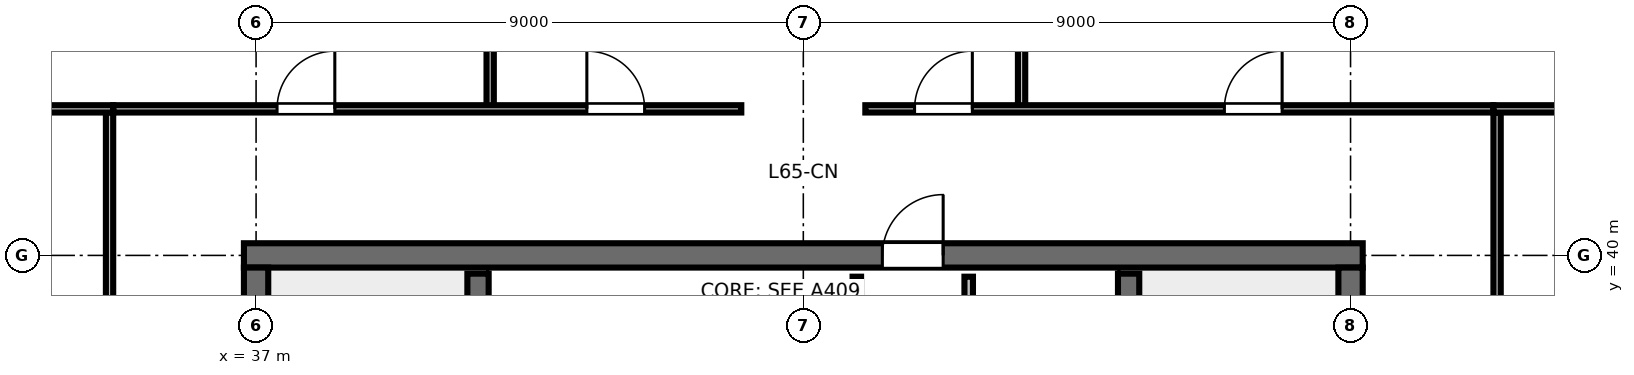
"""IFC4 building model, lengths in metres.
Left out: names, types, materials, properties, quantities, classifications, styles, units other than length and angle.
Written with IfcOpenShell. Run it as: python <this file> out.ifc"""

import sys

from ifc_helpers import new_model, si_unit, direction, frame, frame_2d, origin, place, context, subcontext, project, spatial, rectangle, extrude, element, fill, save


model = new_model("IFC4")
c1 = context("Model", 3, precision=1e-05, world=origin(), true_north=direction((0.0, 1.0)))
c2 = subcontext(c1, "Body", "Model", "MODEL_VIEW")
j1 = project(units=[si_unit("LENGTHUNIT", "METRE"), si_unit("PLANEANGLEUNIT", "RADIAN")], contexts=[c1])
p1 = place(None, origin())
s1 = spatial("IfcSite", under=j1, at=p1, CompositionType="ELEMENT")
p2 = place(p1, origin())
s2 = spatial("IfcBuilding", under=s1, at=p2, CompositionType="ELEMENT")
p3 = place(p2, frame((0.0, 0.0, 246.6)))
s3 = spatial("IfcBuildingStorey", under=s2, at=p3, CompositionType="ELEMENT", Elevation=246.6)
p4 = place(p3, frame((36.8, 40.0, 0.0), z_axis=(0.0, 0.0, 1.0), x_axis=(1.0, 0.0, 0.0)))
e1 = element("IfcWall", 1, at=p4, inside=s3, PredefinedType="SHEAR", context=c2, shape_type="SweptSolid", body=[
    extrude(rectangle(XDim=18.4, YDim=0.4, at=frame_2d((9.2, 0.0))), origin(), (0.0, 0.0, 1.0), 3.36),
])
p5 = place(p4, frame((10.5, 0.0, 0.0)))
e2 = element("IfcOpeningElement", 2, at=p5, cuts=e1, PredefinedType="OPENING", context=c2, shape_type="SweptSolid", body=[
    extrude(rectangle(XDim=1.0, YDim=2.15, at=frame_2d((0.5, 1.075))), frame((0.0, 0.21, 0.0), z_axis=(0.0, -1.0, 0.0), x_axis=(1.0, 0.0, 0.0)), (0.0, 0.0, 1.0), 0.42),
])
p6 = place(p3, frame((37.0, 24.2, 0.0), z_axis=(0.0, 0.0, 1.0), x_axis=(0.0, 1.0, 0.0)))
e3 = element("IfcWall", 3, at=p6, inside=s3, PredefinedType="SHEAR", context=c2, shape_type="SweptSolid", body=[
    extrude(rectangle(XDim=15.6, YDim=0.4, at=frame_2d((7.8, 0.0))), origin(), (0.0, 0.0, 1.0), 3.36),
])
p7 = place(p6, frame((5.325, 0.0, 0.0)))
e4 = element("IfcOpeningElement", 4, at=p7, cuts=e3, PredefinedType="OPENING", context=c2, shape_type="SweptSolid", body=[
    extrude(rectangle(XDim=1.15, YDim=2.15, at=frame_2d((0.575, 1.075))), frame((0.0, 0.21, 0.0), z_axis=(0.0, -1.0, 0.0), x_axis=(1.0, 0.0, 0.0)), (0.0, 0.0, 1.0), 0.42),
])
p8 = place(p3, frame((55.0, 24.2, 0.0), z_axis=(0.0, 0.0, 1.0), x_axis=(0.0, 1.0, 0.0)))
e5 = element("IfcWall", 5, at=p8, inside=s3, PredefinedType="SHEAR", context=c2, shape_type="SweptSolid", body=[
    extrude(rectangle(XDim=15.6, YDim=0.4, at=frame_2d((7.8, 0.0))), origin(), (0.0, 0.0, 1.0), 3.36),
])
p9 = place(p8, frame((5.325, 0.0, 0.0)))
e6 = element("IfcOpeningElement", 6, at=p9, cuts=e5, PredefinedType="OPENING", context=c2, shape_type="SweptSolid", body=[
    extrude(rectangle(XDim=1.15, YDim=2.15, at=frame_2d((0.575, 1.075))), frame((0.0, 0.21, 0.0), z_axis=(0.0, -1.0, 0.0), x_axis=(1.0, 0.0, 0.0)), (0.0, 0.0, 1.0), 0.42),
])
for number, where, z_axis, x_axis in (
    (7, (65.144, 41.854, 0.0), (0.0, 0.0, 1.0), (-0.707, 0.707, 0.0)),
    (8, (34.396, 49.394, 0.0), (0.0, 0.0, 1.0), (-0.707, -0.707, 0.0)),
):
    element("IfcWall", number, at=place(p3, frame(where, z_axis=z_axis, x_axis=x_axis)), inside=s3, PredefinedType="STANDARD", context=c2, shape_type="SweptSolid", body=[
        extrude(rectangle(XDim=10.662, YDim=0.265, at=frame_2d((5.331, 0.0))), origin(), (0.0, 0.0, 1.0), 2.832),
    ])
for number, where, z_axis, x_axis in (
    (9, (40.65, 32.0, 0.0), (0.0, 0.0, 1.0), (0.0, 1.0, 0.0)),
    (10, (51.35, 32.0, 0.0), (0.0, 0.0, 1.0), (0.0, 1.0, 0.0)),
):
    element("IfcWall", number, at=place(p3, frame(where, z_axis=z_axis, x_axis=x_axis)), inside=s3, PredefinedType="SHEAR", context=c2, shape_type="SweptSolid", body=[
        extrude(rectangle(XDim=7.7, YDim=0.35, at=frame_2d((3.85, 0.0))), origin(), (0.0, 0.0, 1.0), 3.6),
    ])
p10 = place(p3, frame((46.88, 32.05, 0.0), z_axis=(0.0, 0.0, 1.0), x_axis=(0.0, 1.0, 0.0)))
e11 = element("IfcWall", 11, at=p10, inside=s3, PredefinedType="PARTITIONING", context=c2, shape_type="SweptSolid", body=[
    extrude(rectangle(XDim=7.6, YDim=0.14, at=frame_2d((3.8, 0.0))), origin(), (0.0, 0.0, 1.0), 3.375),
])
p11 = place(p10, frame((3.4, 0.0, 0.0)))
e12 = element("IfcOpeningElement", 12, at=p11, cuts=e11, PredefinedType="OPENING", context=c2, shape_type="SweptSolid", body=[
    extrude(rectangle(XDim=0.95, YDim=2.15, at=frame_2d((0.475, 1.075))), frame((0.0, 0.08, 0.0), z_axis=(0.0, -1.0, 0.0), x_axis=(1.0, 0.0, 0.0)), (0.0, 0.0, 1.0), 0.16),
])
p12 = place(p3, frame((48.72, 32.05, 0.0), z_axis=(0.0, 0.0, 1.0), x_axis=(0.0, 1.0, 0.0)))
e13 = element("IfcWall", 13, at=p12, inside=s3, PredefinedType="PARTITIONING", context=c2, shape_type="SweptSolid", body=[
    extrude(rectangle(XDim=7.6, YDim=0.14, at=frame_2d((3.8, 0.0))), origin(), (0.0, 0.0, 1.0), 3.375),
])
p13 = place(p12, frame((0.8, 0.0, 0.0)))
e14 = element("IfcOpeningElement", 14, at=p13, cuts=e13, PredefinedType="OPENING", context=c2, shape_type="SweptSolid", body=[
    extrude(rectangle(XDim=0.9, YDim=2.15, at=frame_2d((0.45, 1.075))), frame((0.0, 0.08, 0.0), z_axis=(0.0, -1.0, 0.0), x_axis=(1.0, 0.0, 0.0)), (0.0, 0.0, 1.0), 0.16),
])
p14 = place(p12, frame((3.35, 0.0, 0.0)))
e15 = element("IfcOpeningElement", 15, at=p14, cuts=e13, PredefinedType="OPENING", context=c2, shape_type="SweptSolid", body=[
    extrude(rectangle(XDim=0.9, YDim=2.15, at=frame_2d((0.45, 1.075))), frame((0.0, 0.08, 0.0), z_axis=(0.0, -1.0, 0.0), x_axis=(1.0, 0.0, 0.0)), (0.0, 0.0, 1.0), 0.16),
])
p15 = place(p12, frame((5.9, 0.0, 0.0)))
e16 = element("IfcOpeningElement", 16, at=p15, cuts=e13, PredefinedType="OPENING", context=c2, shape_type="SweptSolid", body=[
    extrude(rectangle(XDim=0.92, YDim=2.15, at=frame_2d((0.46, 1.075))), frame((0.0, 0.08, 0.0), z_axis=(0.0, -1.0, 0.0), x_axis=(1.0, 0.0, 0.0)), (0.0, 0.0, 1.0), 0.16),
])
p16 = place(p3, frame((40.85, 42.41, 0.0), z_axis=(0.0, 0.0, 1.0), x_axis=(0.0, 1.0, 0.0)))
e17 = element("IfcWall", 17, at=p16, inside=s3, PredefinedType="PARTITIONING", context=c2, shape_type="SweptSolid", body=[
    extrude(rectangle(XDim=6.41, YDim=0.12, at=frame_2d((3.205, 0.0))), origin(), (0.0, 0.0, 1.0), 2.655),
])
p17 = place(p16, frame((1.4, 0.0, 0.0)))
e18 = element("IfcOpeningElement", 18, at=p17, cuts=e17, PredefinedType="OPENING", context=c2, shape_type="SweptSolid", body=[
    extrude(rectangle(XDim=0.9, YDim=2.15, at=frame_2d((0.45, 1.075))), frame((0.0, 0.07, 0.0), z_axis=(0.0, -1.0, 0.0), x_axis=(1.0, 0.0, 0.0)), (0.0, 0.0, 1.0), 0.14),
])
p18 = place(p3, frame((49.59, 42.41, 0.0), z_axis=(0.0, 0.0, 1.0), x_axis=(0.0, 1.0, 0.0)))
e19 = element("IfcWall", 19, at=p18, inside=s3, PredefinedType="PARTITIONING", context=c2, shape_type="SweptSolid", body=[
    extrude(rectangle(XDim=6.41, YDim=0.12, at=frame_2d((3.205, 0.0))), origin(), (0.0, 0.0, 1.0), 2.655),
])
p19 = place(p18, frame((1.4, 0.0, 0.0)))
e20 = element("IfcOpeningElement", 20, at=p19, cuts=e19, PredefinedType="OPENING", context=c2, shape_type="SweptSolid", body=[
    extrude(rectangle(XDim=0.9, YDim=2.15, at=frame_2d((0.45, 1.075))), frame((0.0, 0.07, 0.0), z_axis=(0.0, -1.0, 0.0), x_axis=(1.0, 0.0, 0.0)), (0.0, 0.0, 1.0), 0.14),
])
p20 = place(p3, frame((34.65, 42.41, 0.0), z_axis=(0.0, 0.0, 1.0), x_axis=(1.0, 0.0, 0.0)))
e21 = element("IfcWall", 21, at=p20, inside=s3, PredefinedType="PARTITIONING", context=c2, shape_type="SweptSolid", body=[
    extrude(rectangle(XDim=10.33, YDim=0.12, at=frame_2d((5.165, 0.0))), origin(), (0.0, 0.0, 1.0), 2.655),
])
p21 = place(p20, frame((2.695, 0.0, 0.0)))
e22 = element("IfcOpeningElement", 22, at=p21, cuts=e21, PredefinedType="OPENING", context=c2, shape_type="SweptSolid", body=[
    extrude(rectangle(XDim=0.95, YDim=2.15, at=frame_2d((0.475, 1.075))), frame((0.0, 0.07, 0.0), z_axis=(0.0, -1.0, 0.0), x_axis=(1.0, 0.0, 0.0)), (0.0, 0.0, 1.0), 0.14),
])
p22 = place(p20, frame((7.79, 0.0, 0.0)))
e23 = element("IfcOpeningElement", 23, at=p22, cuts=e21, PredefinedType="OPENING", context=c2, shape_type="SweptSolid", body=[
    extrude(rectangle(XDim=0.95, YDim=2.15, at=frame_2d((0.475, 1.075))), frame((0.0, 0.07, 0.0), z_axis=(0.0, -1.0, 0.0), x_axis=(1.0, 0.0, 0.0)), (0.0, 0.0, 1.0), 0.14),
])
p23 = place(p3, frame((47.02, 42.41, 0.0), z_axis=(0.0, 0.0, 1.0), x_axis=(1.0, 0.0, 0.0)))
e24 = element("IfcWall", 24, at=p23, inside=s3, PredefinedType="PARTITIONING", context=c2, shape_type="SweptSolid", body=[
    extrude(rectangle(XDim=10.33, YDim=0.12, at=frame_2d((5.165, 0.0))), origin(), (0.0, 0.0, 1.0), 2.655),
])
p24 = place(p23, frame((0.81, 0.0, 0.0)))
e25 = element("IfcOpeningElement", 25, at=p24, cuts=e24, PredefinedType="OPENING", context=c2, shape_type="SweptSolid", body=[
    extrude(rectangle(XDim=0.95, YDim=2.15, at=frame_2d((0.475, 1.075))), frame((0.0, 0.07, 0.0), z_axis=(0.0, -1.0, 0.0), x_axis=(1.0, 0.0, 0.0)), (0.0, 0.0, 1.0), 0.14),
])
p25 = place(p23, frame((5.905, 0.0, 0.0)))
e26 = element("IfcOpeningElement", 26, at=p25, cuts=e24, PredefinedType="OPENING", context=c2, shape_type="SweptSolid", body=[
    extrude(rectangle(XDim=0.95, YDim=2.15, at=frame_2d((0.475, 1.075))), frame((0.0, 0.07, 0.0), z_axis=(0.0, -1.0, 0.0), x_axis=(1.0, 0.0, 0.0)), (0.0, 0.0, 1.0), 0.14),
])
p26 = place(p3, frame((34.59, 21.65, 0.0), z_axis=(0.0, 0.0, 1.0), x_axis=(0.0, 1.0, 0.0)))
e27 = element("IfcWall", 27, at=p26, inside=s3, PredefinedType="PARTITIONING", context=c2, shape_type="SweptSolid", body=[
    extrude(rectangle(XDim=20.7, YDim=0.12, at=frame_2d((10.35, 0.0))), origin(), (0.0, 0.0, 1.0), 2.655),
])
p27 = place(p26, frame((4.26, 0.0, 0.0)))
e28 = element("IfcOpeningElement", 28, at=p27, cuts=e27, PredefinedType="OPENING", context=c2, shape_type="SweptSolid", body=[
    extrude(rectangle(XDim=0.95, YDim=2.15, at=frame_2d((0.475, 1.075))), frame((0.0, 0.07, 0.0), z_axis=(0.0, -1.0, 0.0), x_axis=(1.0, 0.0, 0.0)), (0.0, 0.0, 1.0), 0.14),
])
p28 = place(p26, frame((14.411, 0.0, 0.0)))
e29 = element("IfcOpeningElement", 29, at=p28, cuts=e27, PredefinedType="OPENING", context=c2, shape_type="SweptSolid", body=[
    extrude(rectangle(XDim=0.95, YDim=2.15, at=frame_2d((0.475, 1.075))), frame((0.0, 0.07, 0.0), z_axis=(0.0, -1.0, 0.0), x_axis=(1.0, 0.0, 0.0)), (0.0, 0.0, 1.0), 0.14),
])
p29 = place(p3, frame((57.41, 21.65, 0.0), z_axis=(0.0, 0.0, 1.0), x_axis=(0.0, 1.0, 0.0)))
e30 = element("IfcWall", 30, at=p29, inside=s3, PredefinedType="PARTITIONING", context=c2, shape_type="SweptSolid", body=[
    extrude(rectangle(XDim=20.7, YDim=0.12, at=frame_2d((10.35, 0.0))), origin(), (0.0, 0.0, 1.0), 2.655),
])
p30 = place(p29, frame((9.875, 0.0, 0.0)))
e31 = element("IfcOpeningElement", 31, at=p30, cuts=e30, PredefinedType="OPENING", context=c2, shape_type="SweptSolid", body=[
    extrude(rectangle(XDim=0.95, YDim=2.15, at=frame_2d((0.475, 1.075))), frame((0.0, 0.07, 0.0), z_axis=(0.0, -1.0, 0.0), x_axis=(1.0, 0.0, 0.0)), (0.0, 0.0, 1.0), 0.14),
])
for number, where, z_axis, x_axis in (
    (32, (34.65, 42.41, 0.0), (0.0, 0.0, 1.0), (-1.0, 0.0, 0.0)),
    (33, (57.35, 42.41, 0.0), (0.0, 0.0, 1.0), (1.0, 0.0, 0.0)),
):
    element("IfcWall", number, at=place(p3, frame(where, z_axis=z_axis, x_axis=x_axis)), inside=s3, PredefinedType="PARTITIONING", context=c2, shape_type="SweptSolid", body=[
        extrude(rectangle(XDim=7.22, YDim=0.12, at=frame_2d((3.61, 0.0))), origin(), (0.0, 0.0, 1.0), 2.655),
    ])
p31 = place(p5, origin())
e34 = element("IfcDoor", 34, at=p31, inside=s3, OperationType="SINGLE_SWING_RIGHT", PredefinedType="DOOR", context=c2, shape_type="SweptSolid", body=[
    extrude(rectangle(XDim=1.0, YDim=2.15, at=frame_2d((0.5, 1.075))), frame((0.0, 0.025, 0.0), z_axis=(0.0, -1.0, 0.0), x_axis=(1.0, 0.0, 0.0)), (0.0, 0.0, 1.0), 0.05),
])
fill(e2, e34)
p32 = place(p21, origin())
e35 = element("IfcDoor", 35, at=p32, inside=s3, OperationType="SINGLE_SWING_RIGHT", PredefinedType="DOOR", context=c2, shape_type="SweptSolid", body=[
    extrude(rectangle(XDim=0.95, YDim=2.15, at=frame_2d((0.475, 1.075))), frame((0.0, 0.025, 0.0), z_axis=(0.0, -1.0, 0.0), x_axis=(1.0, 0.0, 0.0)), (0.0, 0.0, 1.0), 0.05),
])
fill(e22, e35)
p33 = place(p22, origin())
e36 = element("IfcDoor", 36, at=p33, inside=s3, OperationType="SINGLE_SWING_LEFT", PredefinedType="DOOR", context=c2, shape_type="SweptSolid", body=[
    extrude(rectangle(XDim=0.95, YDim=2.15, at=frame_2d((0.475, 1.075))), frame((0.0, 0.025, 0.0), z_axis=(0.0, -1.0, 0.0), x_axis=(1.0, 0.0, 0.0)), (0.0, 0.0, 1.0), 0.05),
])
fill(e23, e36)
p34 = place(p24, origin())
e37 = element("IfcDoor", 37, at=p34, inside=s3, OperationType="SINGLE_SWING_RIGHT", PredefinedType="DOOR", context=c2, shape_type="SweptSolid", body=[
    extrude(rectangle(XDim=0.95, YDim=2.15, at=frame_2d((0.475, 1.075))), frame((0.0, 0.025, 0.0), z_axis=(0.0, -1.0, 0.0), x_axis=(1.0, 0.0, 0.0)), (0.0, 0.0, 1.0), 0.05),
])
fill(e25, e37)
p35 = place(p25, origin())
e38 = element("IfcDoor", 38, at=p35, inside=s3, OperationType="SINGLE_SWING_RIGHT", PredefinedType="DOOR", context=c2, shape_type="SweptSolid", body=[
    extrude(rectangle(XDim=0.95, YDim=2.15, at=frame_2d((0.475, 1.075))), frame((0.0, 0.025, 0.0), z_axis=(0.0, -1.0, 0.0), x_axis=(1.0, 0.0, 0.0)), (0.0, 0.0, 1.0), 0.05),
])
fill(e26, e38)
save(model, sys.argv[1])
